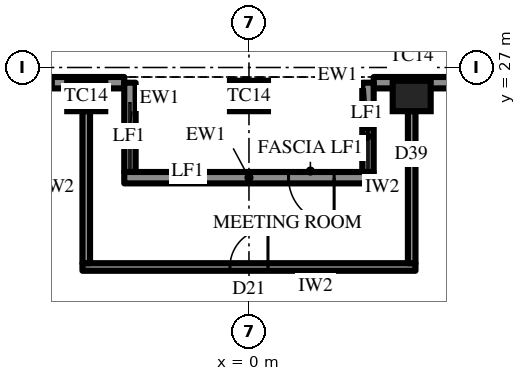
"""IFC4 building model, lengths in metres.
Left out: names, types, materials, properties, quantities, classifications, styles, units other than length and angle.
Written with IfcOpenShell. Run it as: python <this file> out.ifc"""

import sys

from ifc_helpers import new_model, si_unit, direction, frame, frame_2d, origin, origin_2d, place, context, subcontext, project, spatial, rectangle, extrude, element, fill, save


model = new_model("IFC4")
c1 = context("Model", 3, precision=1e-05, world=origin(), true_north=direction((0.0, 1.0)))
c2 = subcontext(c1, "Body", "Model", "MODEL_VIEW")
j1 = project(units=[si_unit("LENGTHUNIT", "METRE"), si_unit("PLANEANGLEUNIT", "RADIAN")], contexts=[c1])
p1 = place(None, origin())
s1 = spatial("IfcSite", under=j1, at=p1, CompositionType="ELEMENT")
p2 = place(p1, origin())
s2 = spatial("IfcBuilding", under=s1, at=p2, CompositionType="ELEMENT")
p3 = place(p2, frame((0.0, 0.0, 349.3)))
s3 = spatial("IfcBuildingStorey", under=s2, at=p3, CompositionType="ELEMENT", Elevation=349.3)
for number, where, z_axis, x_axis in (
    (1, (4.282, 26.25, 0.0), (0.0, 0.0, 1.0), (-1.0, 0.0, 0.0)),
    (2, (0.0, 26.25, 0.0), (0.0, 0.0, 1.0), (-1.0, 0.0, 0.0)),
    (3, (-4.282, 26.25, 0.0), (0.0, 0.0, 1.0), (-1.0, 0.0, 0.0)),
):
    element("IfcColumn", number, at=place(p3, frame(where, z_axis=z_axis, x_axis=x_axis)), inside=s3, PredefinedType="COLUMN", context=c2, shape_type="SweptSolid", body=[
        extrude(rectangle(XDim=1.0, YDim=0.8, at=origin_2d()), origin(), (0.0, 0.0, 1.0), 4.2),
    ])
p4 = place(p3, frame((12.846, 26.6, 0.0), z_axis=(0.0, 0.0, 1.0), x_axis=(-1.0, 0.0, 0.0)))
e4 = element("IfcWall", 4, at=p4, inside=s3, PredefinedType="SOLIDWALL", context=c2, shape_type="SweptSolid", body=[
    extrude(rectangle(XDim=9.564, YDim=0.3, at=frame_2d((4.782, 0.0))), origin(), (0.0, 0.0, 1.0), 2.9),
])
p5 = place(p4, frame((0.866, 0.0, 0.6)))
e5 = element("IfcOpeningElement", 5, at=p5, cuts=e4, PredefinedType="OPENING", context=c2, shape_type="SweptSolid", body=[
    extrude(rectangle(XDim=2.55, YDim=2.05, at=frame_2d((1.275, 1.025))), frame((0.0, 0.16, 0.0), z_axis=(0.0, -1.0, 0.0), x_axis=(1.0, 0.0, 0.0)), (0.0, 0.0, 1.0), 0.32),
])
p6 = place(p4, frame((5.823, 0.0, 0.0)))
e6 = element("IfcOpeningElement", 6, at=p6, cuts=e4, PredefinedType="OPENING", context=c2, shape_type="SweptSolid", body=[
    extrude(rectangle(XDim=1.2, YDim=2.4, at=frame_2d((0.6, 1.2))), frame((0.0, 0.16, 0.0), z_axis=(0.0, -1.0, 0.0), x_axis=(1.0, 0.0, 0.0)), (0.0, 0.0, 1.0), 0.32),
])
p7 = place(p3, frame((-3.282, 26.6, 0.0), z_axis=(0.0, 0.0, 1.0), x_axis=(-1.0, 0.0, 0.0)))
e7 = element("IfcWall", 7, at=p7, inside=s3, PredefinedType="SOLIDWALL", context=c2, shape_type="SweptSolid", body=[
    extrude(rectangle(XDim=9.564, YDim=0.3, at=frame_2d((4.782, 0.0))), origin(), (0.0, 0.0, 1.0), 2.9),
])
p8 = place(p7, frame((1.866, 0.0, 0.6)))
e8 = element("IfcOpeningElement", 8, at=p8, cuts=e7, PredefinedType="OPENING", context=c2, shape_type="SweptSolid", body=[
    extrude(rectangle(XDim=2.55, YDim=2.05, at=frame_2d((1.275, 1.025))), frame((0.0, 0.16, 0.0), z_axis=(0.0, -1.0, 0.0), x_axis=(1.0, 0.0, 0.0)), (0.0, 0.0, 1.0), 0.32),
])
p9 = place(p7, frame((6.148, 0.0, 0.6)))
e9 = element("IfcOpeningElement", 9, at=p9, cuts=e7, PredefinedType="OPENING", context=c2, shape_type="SweptSolid", body=[
    extrude(rectangle(XDim=2.55, YDim=2.05, at=frame_2d((1.275, 1.025))), frame((0.0, 0.16, 0.0), z_axis=(0.0, -1.0, 0.0), x_axis=(1.0, 0.0, 0.0)), (0.0, 0.0, 1.0), 0.32),
])
for number, where, z_axis, x_axis in (
    (10, (3.132, 26.6, 0.0), (0.0, 0.0, 1.0), (0.0, -1.0, 0.0)),
    (11, (-3.132, 26.6, 0.0), (0.0, 0.0, 1.0), (0.0, -1.0, 0.0)),
):
    element("IfcWall", number, at=place(p3, frame(where, z_axis=z_axis, x_axis=x_axis)), inside=s3, PredefinedType="SOLIDWALL", context=c2, shape_type="SweptSolid", body=[
        extrude(rectangle(XDim=2.35, YDim=0.3, at=frame_2d((1.175, 0.0))), origin(), (0.0, 0.0, 1.0), 2.9),
    ])
p10 = place(p3, frame((3.282, 24.1, 0.0), z_axis=(0.0, 0.0, 1.0), x_axis=(-1.0, 0.0, 0.0)))
e12 = element("IfcWall", 12, at=p10, inside=s3, PredefinedType="SOLIDWALL", context=c2, shape_type="SweptSolid", body=[
    extrude(rectangle(XDim=6.564, YDim=0.3, at=frame_2d((3.282, 0.0))), origin(), (0.0, 0.0, 1.0), 2.9),
])
p11 = place(p10, frame((1.041, 0.0, 0.0)))
e13 = element("IfcOpeningElement", 13, at=p11, cuts=e12, PredefinedType="OPENING", context=c2, shape_type="SweptSolid", body=[
    extrude(rectangle(XDim=1.2, YDim=2.4, at=frame_2d((0.6, 1.2))), frame((0.0, 0.16, 0.0), z_axis=(0.0, -1.0, 0.0), x_axis=(1.0, 0.0, 0.0)), (0.0, 0.0, 1.0), 0.32),
])
p12 = place(p3, frame((4.382, 21.75, 0.0), z_axis=(0.0, 0.0, 1.0), x_axis=(-1.0, 0.0, 0.0)))
e14 = element("IfcWall", 14, at=p12, inside=s3, PredefinedType="PARTITIONING", context=c2, shape_type="SweptSolid", body=[
    extrude(rectangle(XDim=8.764, YDim=0.2, at=frame_2d((4.382, 0.0))), origin(), (0.0, 0.0, 1.0), 4.0),
])
p13 = place(p12, frame((3.882, 0.0, 0.0)))
e15 = element("IfcOpeningElement", 15, at=p13, cuts=e14, PredefinedType="OPENING", context=c2, shape_type="SweptSolid", body=[
    extrude(rectangle(XDim=1.0, YDim=2.2, at=frame_2d((0.5, 1.1))), frame((0.0, 0.11, 0.0), z_axis=(0.0, -1.0, 0.0), x_axis=(1.0, 0.0, 0.0)), (0.0, 0.0, 1.0), 0.22),
])
for number, where, z_axis, x_axis in (
    (16, (4.282, 21.85, 0.0), (0.0, 0.0, 1.0), (0.0, 1.0, 0.0)),
    (17, (-4.282, 21.85, 0.0), (0.0, 0.0, 1.0), (0.0, 1.0, 0.0)),
):
    element("IfcWall", number, at=place(p3, frame(where, z_axis=z_axis, x_axis=x_axis)), inside=s3, PredefinedType="PARTITIONING", context=c2, shape_type="SweptSolid", body=[
        extrude(rectangle(XDim=4.0, YDim=0.2, at=frame_2d((2.0, 0.0))), origin(), (0.0, 0.0, 1.0), 2.992),
    ])
p14 = place(p8, origin())
e18 = element("IfcWindow", 18, at=p14, inside=s3, PartitioningType="SINGLE_PANEL", PredefinedType="WINDOW", context=c2, shape_type="SweptSolid", body=[
    extrude(rectangle(XDim=2.55, YDim=2.05, at=frame_2d((1.275, 1.025))), frame((0.0, 0.03, 0.0), z_axis=(0.0, -1.0, 0.0), x_axis=(1.0, 0.0, 0.0)), (0.0, 0.0, 1.0), 0.06),
])
fill(e8, e18)
p15 = place(p11, origin())
e19 = element("IfcDoor", 19, at=p15, inside=s3, OperationType="SINGLE_SWING_RIGHT", PredefinedType="DOOR", context=c2, shape_type="SweptSolid", body=[
    extrude(rectangle(XDim=1.2, YDim=2.4, at=frame_2d((0.6, 1.2))), frame((0.0, 0.025, 0.0), z_axis=(0.0, -1.0, 0.0), x_axis=(1.0, 0.0, 0.0)), (0.0, 0.0, 1.0), 0.05),
])
fill(e13, e19)
p16 = place(p13, frame((1.0, 0.0, 0.0), z_axis=(0.0, 0.0, 1.0), x_axis=(-1.0, 0.0, 0.0)))
e20 = element("IfcDoor", 20, at=p16, inside=s3, OperationType="SINGLE_SWING_LEFT", PredefinedType="DOOR", context=c2, shape_type="SweptSolid", body=[
    extrude(rectangle(XDim=1.0, YDim=2.2, at=frame_2d((0.5, 1.1))), frame((0.0, 0.025, 0.0), z_axis=(0.0, -1.0, 0.0), x_axis=(1.0, 0.0, 0.0)), (0.0, 0.0, 1.0), 0.05),
])
fill(e15, e20)
save(model, sys.argv[1])
